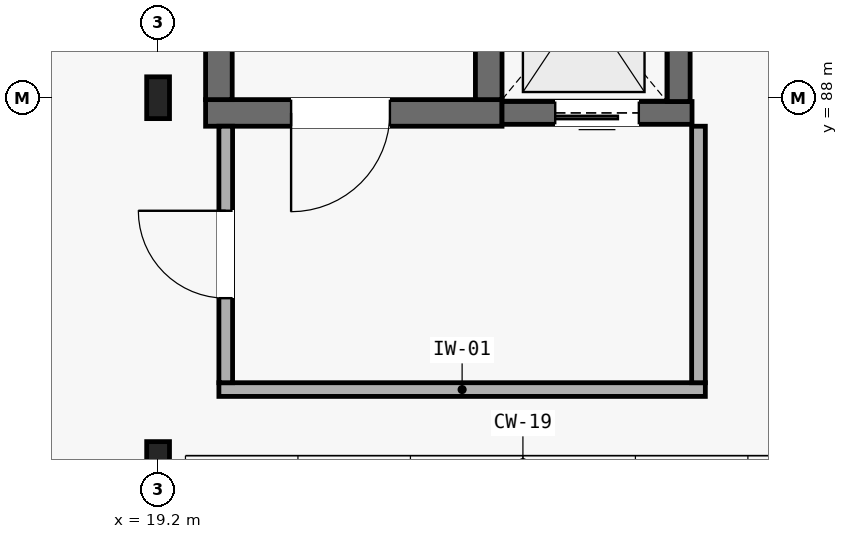
"""IFC4 building model, lengths in metres.
Left out: names, types, materials, properties, quantities, classifications, styles, units other than length and angle.
Written with IfcOpenShell. Run it as: python <this file> out.ifc"""

import sys

from ifc_helpers import new_model, si_unit, direction, frame, frame_2d, origin, origin_2d, place, context, subcontext, project, spatial, rectangle, i_section, extrude, element, fill, save


model = new_model("IFC4")
c1 = context("Model", 3, precision=1e-05, world=origin(), true_north=direction((0.0, 1.0)))
c2 = subcontext(c1, "Body", "Model", "MODEL_VIEW")
j1 = project(units=[si_unit("LENGTHUNIT", "METRE"), si_unit("PLANEANGLEUNIT", "RADIAN")], contexts=[c1])
p1 = place(None, origin())
s1 = spatial("IfcSite", under=j1, at=p1, CompositionType="ELEMENT")
p2 = place(p1, origin())
s2 = spatial("IfcBuilding", under=s1, at=p2, CompositionType="ELEMENT")
p3 = place(p2, frame((0.0, 0.0, 17.85)))
s3 = spatial("IfcBuildingStorey", under=s2, at=p3, CompositionType="ELEMENT", Elevation=17.85)
for number, where, z_axis, x_axis in (
    (1, (19.2, 83.2, 0.0), (0.0, 0.0, 1.0), (1.0, 0.0, 0.0)),
    (2, (19.2, 88.0, 0.0), (0.0, 0.0, 1.0), (1.0, 0.0, 0.0)),
):
    element("IfcColumn", number, at=place(p3, frame(where, z_axis=z_axis, x_axis=x_axis)), inside=s3, PredefinedType="COLUMN", context=c2, shape_type="SweptSolid", body=[
        extrude(i_section(OverallWidth=0.3, OverallDepth=0.55, WebThickness=0.015, FlangeThickness=0.029, FilletRadius=0.027, at=origin_2d()), origin(), (0.0, 0.0, 1.0), 4.2),
    ])
p4 = place(p3, frame((19.825, 87.8, 0.0), z_axis=(0.0, 0.0, 1.0), x_axis=(1.0, 0.0, 0.0)))
e3 = element("IfcWall", 3, at=p4, inside=s3, PredefinedType="SHEAR", context=c2, shape_type="SweptSolid", body=[
    extrude(rectangle(XDim=3.9, YDim=0.35, at=frame_2d((1.95, 0.0))), origin(), (0.0, 0.0, 1.0), 3.99),
])
p5 = place(p4, frame((1.125, 0.0, 0.0)))
e4 = element("IfcOpeningElement", 4, at=p5, cuts=e3, PredefinedType="OPENING", context=c2, shape_type="SweptSolid", body=[
    extrude(rectangle(XDim=1.3, YDim=2.15, at=frame_2d((0.65, 1.075))), frame((0.0, 0.185, 0.0), z_axis=(0.0, -1.0, 0.0), x_axis=(1.0, 0.0, 0.0)), (0.0, 0.0, 1.0), 0.37),
])
for number, where, z_axis, x_axis in (
    (5, (20.0, 87.975, 0.0), (0.0, 0.0, 1.0), (0.0, 1.0, 0.0)),
    (6, (23.55, 87.975, 0.0), (0.0, 0.0, 1.0), (0.0, 1.0, 0.0)),
):
    element("IfcWall", number, at=place(p3, frame(where, z_axis=z_axis, x_axis=x_axis)), inside=s3, PredefinedType="SHEAR", context=c2, shape_type="SweptSolid", body=[
        extrude(rectangle(XDim=7.6, YDim=0.35, at=frame_2d((3.8, 0.0))), origin(), (0.0, 0.0, 1.0), 3.99),
    ])
p6 = place(p3, frame((23.725, 87.8, 0.0), z_axis=(0.0, 0.0, 1.0), x_axis=(1.0, 0.0, 0.0)))
e7 = element("IfcWall", 7, at=p6, inside=s3, PredefinedType="SHEAR", context=c2, shape_type="SweptSolid", body=[
    extrude(rectangle(XDim=2.5, YDim=0.3, at=frame_2d((1.25, 0.0))), origin(), (0.0, 0.0, 1.0), 3.99),
])
p7 = place(p6, frame((0.7, 0.0, 0.0)))
e8 = element("IfcOpeningElement", 8, at=p7, cuts=e7, PredefinedType="OPENING", context=c2, shape_type="SweptSolid", body=[
    extrude(rectangle(XDim=1.1, YDim=2.1, at=frame_2d((0.55, 1.05))), frame((0.0, 0.16, 0.0), z_axis=(0.0, -1.0, 0.0), x_axis=(1.0, 0.0, 0.0)), (0.0, 0.0, 1.0), 0.32),
])
p8 = place(p3, frame((26.05, 87.95, 0.0), z_axis=(0.0, 0.0, 1.0), x_axis=(0.0, 1.0, 0.0)))
e9 = element("IfcWall", 9, at=p8, inside=s3, PredefinedType="SHEAR", context=c2, shape_type="SweptSolid", body=[
    extrude(rectangle(XDim=2.65, YDim=0.3, at=frame_2d((1.325, 0.0))), origin(), (0.0, 0.0, 1.0), 3.99),
])
p9 = place(p3, frame((20.0, 84.16, 0.0), z_axis=(0.0, 0.0, 1.0), x_axis=(1.0, 0.0, 0.0)))
e10 = element("IfcWall", 10, at=p9, inside=s3, PredefinedType="PARTITIONING", context=c2, shape_type="SweptSolid", body=[
    extrude(rectangle(XDim=6.4, YDim=0.18, at=frame_2d((3.2, 0.0))), origin(), (0.0, 0.0, 1.0), 3.99),
])
p10 = place(p3, frame((20.09, 84.25, 0.0), z_axis=(0.0, 0.0, 1.0), x_axis=(0.0, 1.0, 0.0)))
e11 = element("IfcWall", 11, at=p10, inside=s3, PredefinedType="PARTITIONING", context=c2, shape_type="SweptSolid", body=[
    extrude(rectangle(XDim=3.375, YDim=0.18, at=frame_2d((1.688, 0.0))), origin(), (0.0, 0.0, 1.0), 3.99),
])
p11 = place(p10, frame((1.113, 0.0, 0.0)))
e12 = element("IfcOpeningElement", 12, at=p11, cuts=e11, PredefinedType="OPENING", context=c2, shape_type="SweptSolid", body=[
    extrude(rectangle(XDim=1.15, YDim=2.15, at=frame_2d((0.575, 1.075))), frame((0.0, 0.1, 0.0), z_axis=(0.0, -1.0, 0.0), x_axis=(1.0, 0.0, 0.0)), (0.0, 0.0, 1.0), 0.2),
])
p12 = place(p3, frame((26.31, 84.25, 0.0), z_axis=(0.0, 0.0, 1.0), x_axis=(0.0, 1.0, 0.0)))
e13 = element("IfcWall", 13, at=p12, inside=s3, PredefinedType="PARTITIONING", context=c2, shape_type="SweptSolid", body=[
    extrude(rectangle(XDim=3.375, YDim=0.18, at=frame_2d((1.688, 0.0))), origin(), (0.0, 0.0, 1.0), 3.99),
])
p13 = place(p5, frame((1.3, 0.0, 0.0), z_axis=(0.0, 0.0, 1.0), x_axis=(-1.0, 0.0, 0.0)))
e14 = element("IfcDoor", 14, at=p13, inside=s3, OperationType="SINGLE_SWING_LEFT", PredefinedType="DOOR", context=c2, shape_type="SweptSolid", body=[
    extrude(rectangle(XDim=1.3, YDim=2.15, at=frame_2d((0.65, 1.075))), frame((0.0, 0.025, 0.0), z_axis=(0.0, -1.0, 0.0), x_axis=(1.0, 0.0, 0.0)), (0.0, 0.0, 1.0), 0.05),
])
fill(e4, e14)
p14 = place(p7, frame((1.1, 0.0, 0.0), z_axis=(0.0, 0.0, 1.0), x_axis=(-1.0, 0.0, 0.0)))
e15 = element("IfcDoor", 15, at=p14, inside=s3, OperationType="SLIDING_TO_LEFT", PredefinedType="DOOR", context=c2, shape_type="SweptSolid", body=[
    extrude(rectangle(XDim=1.1, YDim=2.1, at=frame_2d((0.55, 1.05))), frame((0.0, 0.025, 0.0), z_axis=(0.0, -1.0, 0.0), x_axis=(1.0, 0.0, 0.0)), (0.0, 0.0, 1.0), 0.05),
])
fill(e8, e15)
p15 = place(p11, origin())
e16 = element("IfcDoor", 16, at=p15, inside=s3, OperationType="SINGLE_SWING_RIGHT", PredefinedType="DOOR", context=c2, shape_type="SweptSolid", body=[
    extrude(rectangle(XDim=1.15, YDim=2.15, at=frame_2d((0.575, 1.075))), frame((0.0, 0.025, 0.0), z_axis=(0.0, -1.0, 0.0), x_axis=(1.0, 0.0, 0.0)), (0.0, 0.0, 1.0), 0.05),
])
fill(e12, e16)
save(model, sys.argv[1])
